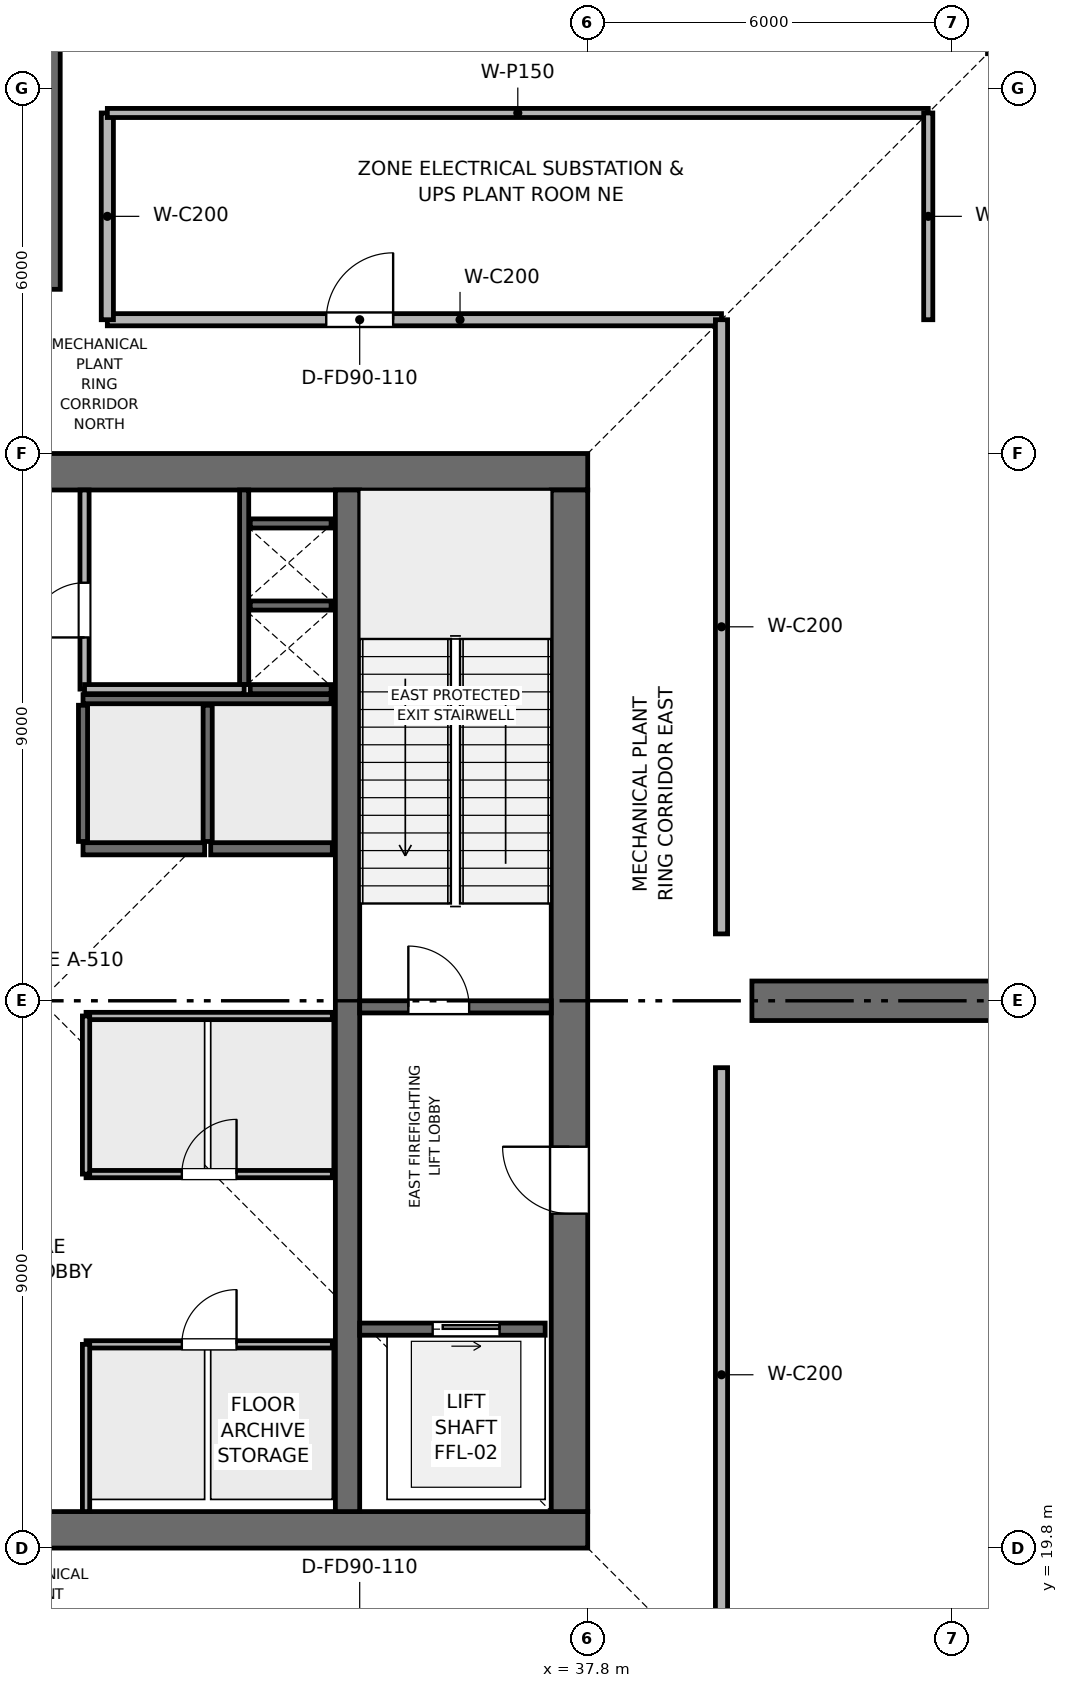
"""IFC4 building model, lengths in metres.
Left out: names, types, materials, properties, quantities, classifications, styles, units other than length and angle.
Written with IfcOpenShell. Run it as: python <this file> out.ifc"""

import sys

from ifc_helpers import new_model, si_unit, direction, frame, frame_2d, origin, origin_2d, place, context, subcontext, project, spatial, rectangle, extrude, element, fill, save


model = new_model("IFC4")
c1 = context("Model", 3, precision=1e-05, world=origin(), true_north=direction((0.0, 1.0)))
c2 = subcontext(c1, "Body", "Model", "MODEL_VIEW")
j1 = project(units=[si_unit("LENGTHUNIT", "METRE"), si_unit("PLANEANGLEUNIT", "RADIAN")], contexts=[c1])
p1 = place(None, origin())
s1 = spatial("IfcSite", under=j1, at=p1, CompositionType="ELEMENT")
p2 = place(p1, origin())
s2 = spatial("IfcBuilding", under=s1, at=p2, CompositionType="ELEMENT")
p3 = place(p2, frame((0.0, 0.0, 284.1)))
s3 = spatial("IfcBuildingStorey", under=s2, at=p3, CompositionType="ELEMENT", Elevation=284.1)
p4 = place(p3, frame((19.8, 20.1, 0.0), z_axis=(0.0, 0.0, 1.0), x_axis=(1.0, 0.0, 0.0)))
e1 = element("IfcWall", 1, at=p4, inside=s3, PredefinedType="SHEAR", context=c2, shape_type="SweptSolid", body=[
    extrude(rectangle(XDim=18.0, YDim=0.6, at=frame_2d((9.0, 0.0))), origin(), (0.0, 0.0, 1.0), 5.4),
])
p5 = place(p3, frame((19.8, 37.5, 0.0), z_axis=(0.0, 0.0, 1.0), x_axis=(1.0, 0.0, 0.0)))
e2 = element("IfcWall", 2, at=p5, inside=s3, PredefinedType="SHEAR", context=c2, shape_type="SweptSolid", body=[
    extrude(rectangle(XDim=18.0, YDim=0.6, at=frame_2d((9.0, 0.0))), origin(), (0.0, 0.0, 1.0), 5.4),
])
p6 = place(p5, frame((7.05, 0.0, 0.0)))
e3 = element("IfcOpeningElement", 3, at=p6, cuts=e2, PredefinedType="OPENING", context=c2, shape_type="SweptSolid", body=[
    extrude(rectangle(XDim=1.1, YDim=2.15, at=frame_2d((0.55, 1.075))), frame((0.0, 0.31, 0.0), z_axis=(0.0, -1.0, 0.0), x_axis=(1.0, 0.0, 0.0)), (0.0, 0.0, 1.0), 0.62),
])
p7 = place(p3, frame((37.5, 20.4, 0.0), z_axis=(0.0, 0.0, 1.0), x_axis=(0.0, 1.0, 0.0)))
e4 = element("IfcWall", 4, at=p7, inside=s3, PredefinedType="SHEAR", context=c2, shape_type="SweptSolid", body=[
    extrude(rectangle(XDim=16.8, YDim=0.6, at=frame_2d((8.4, 0.0))), origin(), (0.0, 0.0, 1.0), 5.4),
])
p8 = place(p7, frame((4.9, 0.0, 0.0)))
e5 = element("IfcOpeningElement", 5, at=p8, cuts=e4, PredefinedType="OPENING", context=c2, shape_type="SweptSolid", body=[
    extrude(rectangle(XDim=1.1, YDim=2.15, at=frame_2d((0.55, 1.075))), frame((0.0, 0.31, 0.0), z_axis=(0.0, -1.0, 0.0), x_axis=(1.0, 0.0, 0.0)), (0.0, 0.0, 1.0), 0.62),
])
p9 = place(p3, frame((33.85, 20.4, 0.0), z_axis=(0.0, 0.0, 1.0), x_axis=(0.0, 1.0, 0.0)))
e6 = element("IfcWall", 6, at=p9, inside=s3, PredefinedType="SHEAR", context=c2, shape_type="SweptSolid", body=[
    extrude(rectangle(XDim=16.8, YDim=0.4, at=frame_2d((8.4, 0.0))), origin(), (0.0, 0.0, 1.0), 5.4),
])
p10 = place(p3, frame((44.85, 44.85, 0.003), z_axis=(-0.109878322657, -0.109878322657, 0.987852979152), x_axis=(0.707106781187, -0.707106781187, 0.0)))
e7 = element("IfcColumn", 7, at=p10, inside=s3, PredefinedType="COLUMN", context=c2, shape_type="SweptSolid", body=[
    extrude(rectangle(XDim=0.95, YDim=0.95, at=origin_2d()), origin(), (0.0, 0.0, 1.0), 5.106),
])
for number, where, z_axis, x_axis in (
    (8, (28.8, 40.5, 0.0), (0.0, 0.0, 1.0), (0.0, 1.0, 0.0)),
    (9, (40.5, 28.8, 0.0), (0.0, 0.0, 1.0), (1.0, 0.0, 0.0)),
):
    element("IfcWall", number, at=place(p3, frame(where, z_axis=z_axis, x_axis=x_axis)), inside=s3, PredefinedType="SHEAR", context=c2, shape_type="SweptSolid", body=[
        extrude(rectangle(XDim=10.025, YDim=0.65, at=frame_2d((5.012, 0.0))), origin(), (0.0, 0.0, 1.0), 5.05),
    ])
p11 = place(p3, frame((34.05, 28.7, 0.0), z_axis=(0.0, 0.0, 1.0), x_axis=(1.0, 0.0, 0.0)))
e10 = element("IfcWall", 10, at=p11, inside=s3, PredefinedType="SHEAR", context=c2, shape_type="SweptSolid", body=[
    extrude(rectangle(XDim=3.15, YDim=0.2, at=frame_2d((1.575, 0.0))), origin(), (0.0, 0.0, 1.0), 5.05),
])
p12 = place(p11, frame((0.8, 0.0, 0.0)))
e11 = element("IfcOpeningElement", 11, at=p12, cuts=e10, PredefinedType="OPENING", context=c2, shape_type="SweptSolid", body=[
    extrude(rectangle(XDim=1.0, YDim=2.1, at=frame_2d((0.5, 1.05))), frame((0.0, 0.11, 0.0), z_axis=(0.0, -1.0, 0.0), x_axis=(1.0, 0.0, 0.0)), (0.0, 0.0, 1.0), 0.22),
])
p13 = place(p3, frame((32.15, 34.0, 0.0), z_axis=(0.0, 0.0, 1.0), x_axis=(0.0, 1.0, 0.0)))
e12 = element("IfcWall", 12, at=p13, inside=s3, PredefinedType="SHEAR", context=c2, shape_type="SweptSolid", body=[
    extrude(rectangle(XDim=3.2, YDim=0.15, at=frame_2d((1.6, 0.0))), origin(), (0.0, 0.0, 1.0), 5.05),
])
for number, where, z_axis, x_axis in (
    (13, (32.25, 33.925, 0.0), (0.0, 0.0, 1.0), (1.0, 0.0, 0.0)),
    (14, (32.25, 35.3, 0.0), (0.0, 0.0, 1.0), (1.0, 0.0, 0.0)),
):
    element("IfcWall", number, at=place(p3, frame(where, z_axis=z_axis, x_axis=x_axis)), inside=s3, PredefinedType="SHEAR", context=c2, shape_type="SweptSolid", body=[
        extrude(rectangle(XDim=1.33, YDim=0.15, at=frame_2d((0.665, 0.0))), origin(), (0.0, 0.0, 1.0), 5.05),
    ])
p14 = place(p3, frame((34.05, 23.4, 0.0), z_axis=(0.0, 0.0, 1.0), x_axis=(1.0, 0.0, 0.0)))
e15 = element("IfcWall", 15, at=p14, inside=s3, PredefinedType="SHEAR", context=c2, shape_type="SweptSolid", body=[
    extrude(rectangle(XDim=3.05, YDim=0.2, at=frame_2d((1.525, 0.0))), origin(), (0.0, 0.0, 1.0), 5.05),
])
p15 = place(p14, frame((1.2, 0.0, 0.0)))
e16 = element("IfcOpeningElement", 16, at=p15, cuts=e15, PredefinedType="OPENING", context=c2, shape_type="SweptSolid", body=[
    extrude(rectangle(XDim=1.1, YDim=2.15, at=frame_2d((0.55, 1.075))), frame((0.0, 0.11, 0.0), z_axis=(0.0, -1.0, 0.0), x_axis=(1.0, 0.0, 0.0)), (0.0, 0.0, 1.0), 0.22),
])
for number, where, z_axis, x_axis in (
    (17, (29.5, 31.3, 0.0), (0.0, 0.0, 1.0), (1.0, 0.0, 0.0)),
    (18, (31.6, 31.3, 0.0), (0.0, 0.0, 1.0), (1.0, 0.0, 0.0)),
):
    element("IfcWall", number, at=place(p3, frame(where, z_axis=z_axis, x_axis=x_axis)), inside=s3, PredefinedType="SHEAR", context=c2, shape_type="SweptSolid", body=[
        extrude(rectangle(XDim=2.0, YDim=0.2, at=frame_2d((1.0, 0.0))), origin(), (0.0, 0.0, 1.0), 5.05),
    ])
p16 = place(p3, frame((32.25, 36.65, 0.0), z_axis=(0.0, 0.0, 1.0), x_axis=(1.0, 0.0, 0.0)))
e19 = element("IfcWall", 19, at=p16, inside=s3, PredefinedType="SHEAR", context=c2, shape_type="SweptSolid", body=[
    extrude(rectangle(XDim=1.33, YDim=0.15, at=frame_2d((0.665, 0.0))), origin(), (0.0, 0.0, 1.0), 5.05),
])
p17 = place(p3, frame((29.5, 33.76, 0.0), z_axis=(0.0, 0.0, 1.0), x_axis=(1.0, 0.0, 0.0)))
e20 = element("IfcWall", 20, at=p17, inside=s3, PredefinedType="SHEAR", context=c2, shape_type="SweptSolid", body=[
    extrude(rectangle(XDim=4.08, YDim=0.15, at=frame_2d((2.04, 0.0))), origin(), (0.0, 0.0, 1.0), 5.05),
])
for number, where, z_axis, x_axis in (
    (21, (29.5, 31.42, 0.0), (0.0, 0.0, 1.0), (0.0, 1.0, 0.0)),
    (22, (31.55, 31.42, 0.0), (0.0, 0.0, 1.0), (0.0, 1.0, 0.0)),
):
    element("IfcWall", number, at=place(p3, frame(where, z_axis=z_axis, x_axis=x_axis)), inside=s3, PredefinedType="SHEAR", context=c2, shape_type="SweptSolid", body=[
        extrude(rectangle(XDim=2.24, YDim=0.15, at=frame_2d((1.12, 0.0))), origin(), (0.0, 0.0, 1.0), 5.05),
    ])
p18 = place(p3, frame((29.525, 33.925, 0.0), z_axis=(0.0, 0.0, 1.0), x_axis=(0.0, 1.0, 0.0)))
e23 = element("IfcWall", 23, at=p18, inside=s3, PredefinedType="PARTITIONING", context=c2, shape_type="SweptSolid", body=[
    extrude(rectangle(XDim=3.275, YDim=0.15, at=frame_2d((1.637, 0.0))), origin(), (0.0, 0.0, 1.0), 5.05),
])
p19 = place(p18, frame((0.85, 0.0, 0.0)))
e24 = element("IfcOpeningElement", 24, at=p19, cuts=e23, PredefinedType="OPENING", context=c2, shape_type="SweptSolid", body=[
    extrude(rectangle(XDim=0.9, YDim=2.1, at=frame_2d((0.45, 1.05))), frame((0.0, 0.085, 0.0), z_axis=(0.0, -1.0, 0.0), x_axis=(1.0, 0.0, 0.0)), (0.0, 0.0, 1.0), 0.17),
])
p20 = place(p3, frame((29.525, 33.925, 0.0), z_axis=(0.0, 0.0, 1.0), x_axis=(1.0, 0.0, 0.0)))
e25 = element("IfcWall", 25, at=p20, inside=s3, PredefinedType="PARTITIONING", context=c2, shape_type="SweptSolid", body=[
    extrude(rectangle(XDim=2.625, YDim=0.15, at=frame_2d((1.312, 0.0))), origin(), (0.0, 0.0, 1.0), 5.05),
])
p21 = place(p3, frame((29.55, 23.15, 0.0), z_axis=(0.0, 0.0, 1.0), x_axis=(1.0, 0.0, 0.0)))
e26 = element("IfcWall", 26, at=p21, inside=s3, PredefinedType="PARTITIONING", context=c2, shape_type="SweptSolid", body=[
    extrude(rectangle(XDim=4.05, YDim=0.12, at=frame_2d((2.025, 0.0))), origin(), (0.0, 0.0, 1.0), 5.05),
])
p22 = place(p21, frame((1.575, 0.0, 0.0)))
e27 = element("IfcOpeningElement", 27, at=p22, cuts=e26, PredefinedType="OPENING", context=c2, shape_type="SweptSolid", body=[
    extrude(rectangle(XDim=0.9, YDim=2.1, at=frame_2d((0.45, 1.05))), frame((0.0, 0.07, 0.0), z_axis=(0.0, -1.0, 0.0), x_axis=(1.0, 0.0, 0.0)), (0.0, 0.0, 1.0), 0.14),
])
p23 = place(p3, frame((29.55, 20.4, 0.0), z_axis=(0.0, 0.0, 1.0), x_axis=(0.0, 1.0, 0.0)))
e28 = element("IfcWall", 28, at=p23, inside=s3, PredefinedType="PARTITIONING", context=c2, shape_type="SweptSolid", body=[
    extrude(rectangle(XDim=2.75, YDim=0.12, at=frame_2d((1.375, 0.0))), origin(), (0.0, 0.0, 1.0), 5.05),
])
p24 = place(p3, frame((29.55, 25.95, 0.0), z_axis=(0.0, 0.0, 1.0), x_axis=(1.0, 0.0, 0.0)))
e29 = element("IfcWall", 29, at=p24, inside=s3, PredefinedType="PARTITIONING", context=c2, shape_type="SweptSolid", body=[
    extrude(rectangle(XDim=4.05, YDim=0.12, at=frame_2d((2.025, 0.0))), origin(), (0.0, 0.0, 1.0), 5.05),
])
p25 = place(p24, frame((1.575, 0.0, 0.0)))
e30 = element("IfcOpeningElement", 30, at=p25, cuts=e29, PredefinedType="OPENING", context=c2, shape_type="SweptSolid", body=[
    extrude(rectangle(XDim=0.9, YDim=2.1, at=frame_2d((0.45, 1.05))), frame((0.0, 0.07, 0.0), z_axis=(0.0, -1.0, 0.0), x_axis=(1.0, 0.0, 0.0)), (0.0, 0.0, 1.0), 0.14),
])
p26 = place(p3, frame((29.55, 28.55, 0.0), z_axis=(0.0, 0.0, 1.0), x_axis=(1.0, 0.0, 0.0)))
e31 = element("IfcWall", 31, at=p26, inside=s3, PredefinedType="PARTITIONING", context=c2, shape_type="SweptSolid", body=[
    extrude(rectangle(XDim=4.05, YDim=0.12, at=frame_2d((2.025, 0.0))), origin(), (0.0, 0.0, 1.0), 5.05),
])
p27 = place(p3, frame((29.55, 25.95, 0.0), z_axis=(0.0, 0.0, 1.0), x_axis=(0.0, 1.0, 0.0)))
e32 = element("IfcWall", 32, at=p27, inside=s3, PredefinedType="PARTITIONING", context=c2, shape_type="SweptSolid", body=[
    extrude(rectangle(XDim=2.6, YDim=0.12, at=frame_2d((1.3, 0.0))), origin(), (0.0, 0.0, 1.0), 5.05),
])
p28 = place(p3, frame((29.9, 40.0, 0.0), z_axis=(0.0, 0.0, 1.0), x_axis=(1.0, 0.0, 0.0)))
e33 = element("IfcWall", 33, at=p28, inside=s3, PredefinedType="PARTITIONING", context=c2, shape_type="SweptSolid", body=[
    extrude(rectangle(XDim=10.1, YDim=0.2, at=frame_2d((5.05, 0.0))), origin(), (0.0, 0.0, 1.0), 4.635),
])
p29 = place(p28, frame((3.6, 0.0, 0.0)))
e34 = element("IfcOpeningElement", 34, at=p29, cuts=e33, PredefinedType="OPENING", context=c2, shape_type="SweptSolid", body=[
    extrude(rectangle(XDim=1.1, YDim=2.15, at=frame_2d((0.55, 1.075))), frame((0.0, 0.11, 0.0), z_axis=(0.0, -1.0, 0.0), x_axis=(1.0, 0.0, 0.0)), (0.0, 0.0, 1.0), 0.22),
])
p30 = place(p3, frame((40.0, 17.6, 0.0), z_axis=(0.0, 0.0, 1.0), x_axis=(0.0, 1.0, 0.0)))
e35 = element("IfcWall", 35, at=p30, inside=s3, PredefinedType="PARTITIONING", context=c2, shape_type="SweptSolid", body=[
    extrude(rectangle(XDim=10.1, YDim=0.2, at=frame_2d((5.05, 0.0))), origin(), (0.0, 0.0, 1.0), 4.635),
])
p31 = place(p3, frame((40.0, 29.9, 0.0), z_axis=(0.0, 0.0, 1.0), x_axis=(0.0, 1.0, 0.0)))
e36 = element("IfcWall", 36, at=p31, inside=s3, PredefinedType="PARTITIONING", context=c2, shape_type="SweptSolid", body=[
    extrude(rectangle(XDim=10.1, YDim=0.2, at=frame_2d((5.05, 0.0))), origin(), (0.0, 0.0, 1.0), 4.635),
])
p32 = place(p3, frame((29.9, 40.0, 0.0), z_axis=(0.0, 0.0, 1.0), x_axis=(0.0, 1.0, 0.0)))
e37 = element("IfcWall", 37, at=p32, inside=s3, PredefinedType="PARTITIONING", context=c2, shape_type="SweptSolid", body=[
    extrude(rectangle(XDim=3.4, YDim=0.2, at=frame_2d((1.7, 0.0))), origin(), (0.0, 0.0, 1.0), 4.675),
])
p33 = place(p3, frame((29.9, 43.4, 0.0), z_axis=(0.0, 0.0, 1.0), x_axis=(1.0, 0.0, 0.0)))
e38 = element("IfcWall", 38, at=p33, inside=s3, PredefinedType="PARTITIONING", context=c2, shape_type="SweptSolid", body=[
    extrude(rectangle(XDim=13.5, YDim=0.15, at=frame_2d((6.75, 0.0))), origin(), (0.0, 0.0, 1.0), 4.635),
])
p34 = place(p3, frame((43.4, 40.0, 0.0), z_axis=(0.0, 0.0, 1.0), x_axis=(0.0, 1.0, 0.0)))
e39 = element("IfcWall", 39, at=p34, inside=s3, PredefinedType="PARTITIONING", context=c2, shape_type="SweptSolid", body=[
    extrude(rectangle(XDim=3.4, YDim=0.15, at=frame_2d((1.7, 0.0))), origin(), (0.0, 0.0, 1.0), 4.635),
])
p35 = place(p12, origin())
e40 = element("IfcDoor", 40, at=p35, inside=s3, OperationType="SINGLE_SWING_LEFT", PredefinedType="DOOR", context=c2, shape_type="SweptSolid", body=[
    extrude(rectangle(XDim=1.0, YDim=2.1, at=frame_2d((0.5, 1.05))), frame((0.0, 0.025, 0.0), z_axis=(0.0, -1.0, 0.0), x_axis=(1.0, 0.0, 0.0)), (0.0, 0.0, 1.0), 0.05),
])
fill(e11, e40)
p36 = place(p15, origin())
e41 = element("IfcDoor", 41, at=p36, inside=s3, OperationType="SLIDING_TO_RIGHT", PredefinedType="DOOR", context=c2, shape_type="SweptSolid", body=[
    extrude(rectangle(XDim=1.1, YDim=2.15, at=frame_2d((0.55, 1.075))), frame((0.0, 0.025, 0.0), z_axis=(0.0, -1.0, 0.0), x_axis=(1.0, 0.0, 0.0)), (0.0, 0.0, 1.0), 0.05),
])
fill(e16, e41)
p37 = place(p19, origin())
e42 = element("IfcDoor", 42, at=p37, inside=s3, OperationType="SINGLE_SWING_LEFT", PredefinedType="DOOR", context=c2, shape_type="SweptSolid", body=[
    extrude(rectangle(XDim=0.9, YDim=2.1, at=frame_2d((0.45, 1.05))), frame((0.0, 0.025, 0.0), z_axis=(0.0, -1.0, 0.0), x_axis=(1.0, 0.0, 0.0)), (0.0, 0.0, 1.0), 0.05),
])
fill(e24, e42)
p38 = place(p22, origin())
e43 = element("IfcDoor", 43, at=p38, inside=s3, OperationType="SINGLE_SWING_RIGHT", PredefinedType="DOOR", context=c2, shape_type="SweptSolid", body=[
    extrude(rectangle(XDim=0.9, YDim=2.1, at=frame_2d((0.45, 1.05))), frame((0.0, 0.025, 0.0), z_axis=(0.0, -1.0, 0.0), x_axis=(1.0, 0.0, 0.0)), (0.0, 0.0, 1.0), 0.05),
])
fill(e27, e43)
p39 = place(p25, origin())
e44 = element("IfcDoor", 44, at=p39, inside=s3, OperationType="SINGLE_SWING_RIGHT", PredefinedType="DOOR", context=c2, shape_type="SweptSolid", body=[
    extrude(rectangle(XDim=0.9, YDim=2.1, at=frame_2d((0.45, 1.05))), frame((0.0, 0.025, 0.0), z_axis=(0.0, -1.0, 0.0), x_axis=(1.0, 0.0, 0.0)), (0.0, 0.0, 1.0), 0.05),
])
fill(e30, e44)
p40 = place(p29, origin())
e45 = element("IfcDoor", 45, at=p40, inside=s3, OperationType="SINGLE_SWING_RIGHT", PredefinedType="DOOR", context=c2, shape_type="SweptSolid", body=[
    extrude(rectangle(XDim=1.1, YDim=2.15, at=frame_2d((0.55, 1.075))), frame((0.0, 0.025, 0.0), z_axis=(0.0, -1.0, 0.0), x_axis=(1.0, 0.0, 0.0)), (0.0, 0.0, 1.0), 0.05),
])
fill(e34, e45)
p41 = place(p8, origin())
e46 = element("IfcDoor", 46, at=p41, inside=s3, OperationType="SINGLE_SWING_RIGHT", PredefinedType="DOOR", context=c2, shape_type="SweptSolid", body=[
    extrude(rectangle(XDim=1.1, YDim=2.15, at=frame_2d((0.55, 1.075))), frame((0.0, 0.025, 0.0), z_axis=(0.0, -1.0, 0.0), x_axis=(1.0, 0.0, 0.0)), (0.0, 0.0, 1.0), 0.05),
])
fill(e5, e46)
save(model, sys.argv[1])
